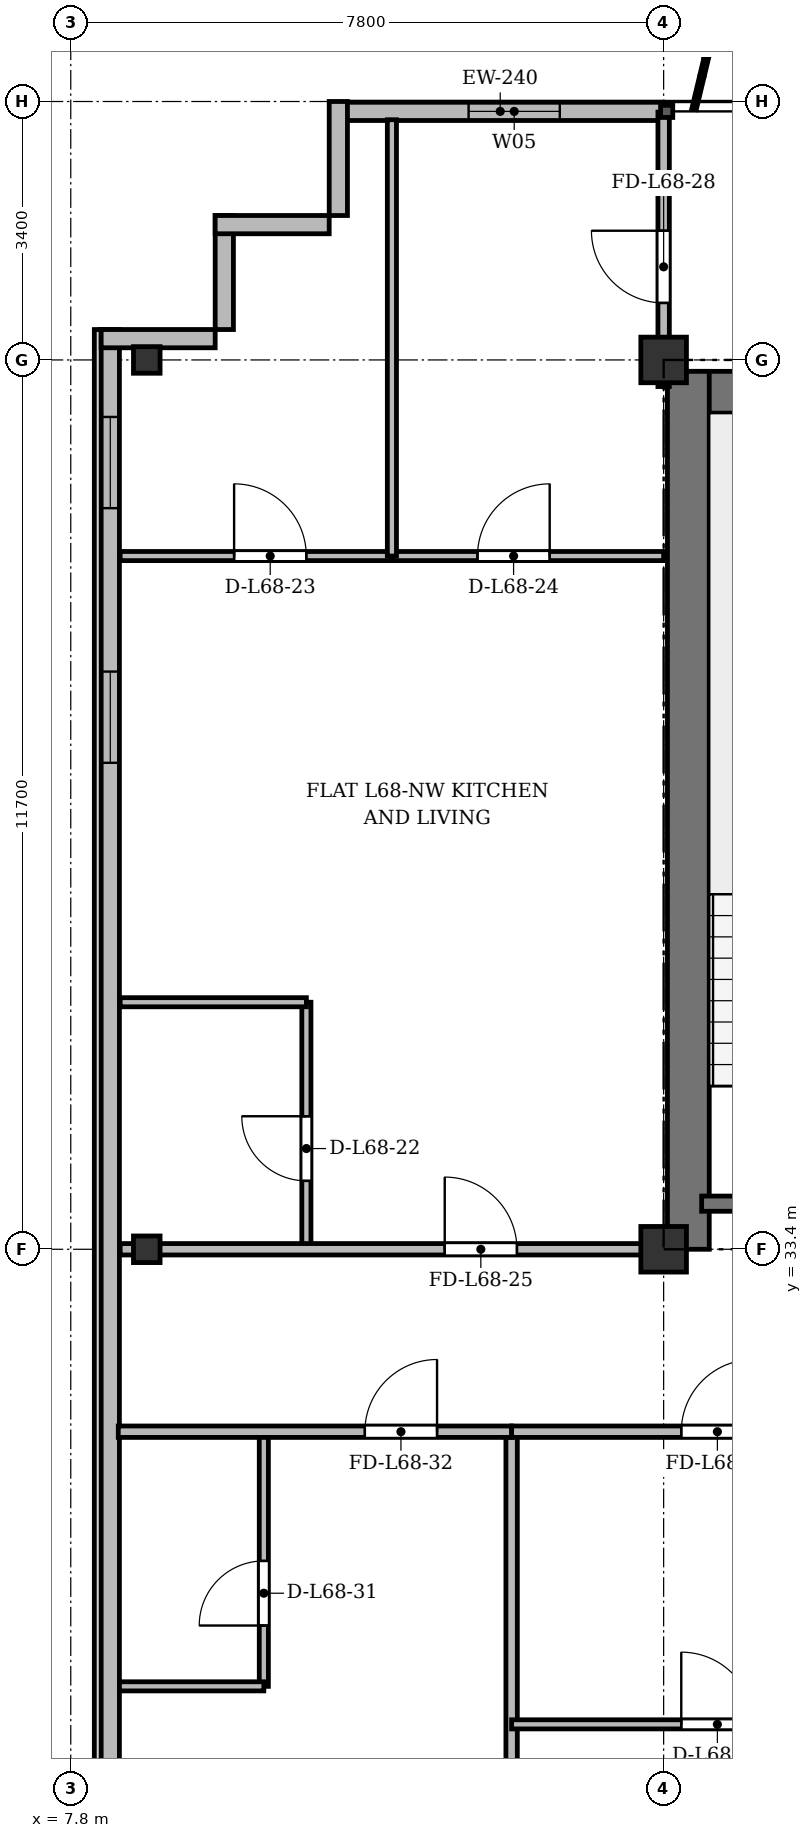
"""IFC4 building model, lengths in metres.
Left out: names, types, materials, properties, quantities, classifications, styles, units other than length and angle.
Written with IfcOpenShell. Run it as: python <this file> out.ifc"""

import sys

from ifc_helpers import new_model, si_unit, direction, frame, frame_2d, origin, origin_2d, place, context, subcontext, project, spatial, rectangle, i_section, extrude, source, transform, mapped, element, fill, save


model = new_model("IFC4")
c1 = context("Model", 3, precision=1e-05, world=origin(), true_north=direction((0.0, 1.0)))
c2 = subcontext(c1, "Body", "Model", "MODEL_VIEW")
j1 = project(units=[si_unit("LENGTHUNIT", "METRE"), si_unit("PLANEANGLEUNIT", "RADIAN")], contexts=[c1])
p1 = place(None, origin())
s1 = spatial("IfcSite", under=j1, at=p1, CompositionType="ELEMENT")
p2 = place(p1, origin())
s2 = spatial("IfcBuilding", under=s1, at=p2, CompositionType="ELEMENT")
p3 = place(p2, frame((0.0, 0.0, 263.1)))
s3 = spatial("IfcBuildingStorey", under=s2, at=p3, CompositionType="ELEMENT", Elevation=263.1)
m1 = source(origin(), c2, "Body", "SweptSolid", [
    extrude(i_section(OverallWidth=0.35, OverallDepth=0.35, WebThickness=0.018, FlangeThickness=0.028, at=origin_2d()), origin(), (0.0, 0.0, 1.0), 3.6),
])
for number, where, z_axis, x_axis in (
    (1, (8.8, 33.4, 0.0), (0.0, 0.0, 1.0), (1.0, 0.0, 0.0)),
    (2, (8.8, 45.1, 0.0), (0.0, 0.0, 1.0), (1.0, 0.0, 0.0)),
):
    element("IfcColumn", number, at=place(p3, frame(where, z_axis=z_axis, x_axis=x_axis)), inside=s3, PredefinedType="COLUMN", context=c2, shape_type="MappedRepresentation", body=[
        mapped(m1, transform((0.0, 0.0, 0.0), x_axis=(1.0, 0.0, 0.0), y_axis=(0.0, 1.0, 0.0), z_axis=(0.0, 0.0, 1.0), scale=1.0)),
    ])
m2 = source(origin(), c2, "Body", "SweptSolid", [
    extrude(rectangle(XDim=0.6, YDim=0.6, at=origin_2d()), origin(), (0.0, 0.0, 1.0), 3.6),
])
for number, where, z_axis, x_axis in (
    (3, (15.6, 33.4, 0.0), (0.0, 0.0, 1.0), (1.0, 0.0, 0.0)),
    (4, (15.6, 45.1, 0.0), (0.0, 0.0, 1.0), (1.0, 0.0, 0.0)),
):
    element("IfcColumn", number, at=place(p3, frame(where, z_axis=z_axis, x_axis=x_axis)), inside=s3, PredefinedType="COLUMN", context=c2, shape_type="MappedRepresentation", body=[
        mapped(m2, transform((0.0, 0.0, 0.0), x_axis=(1.0, 0.0, 0.0), y_axis=(0.0, 1.0, 0.0), z_axis=(0.0, 0.0, 1.0), scale=1.0)),
    ])
p4 = place(p3, frame((11.3, 48.37, 0.0), z_axis=(0.0, 0.0, 1.0), x_axis=(1.0, 0.0, 0.0)))
e5 = element("IfcWall", 5, at=p4, inside=s3, PredefinedType="SOLIDWALL", context=c2, shape_type="SweptSolid", body=[
    extrude(rectangle(XDim=4.3, YDim=0.24, at=frame_2d((2.15, 0.0))), origin(), (0.0, 0.0, 1.0), 3.37),
])
p5 = place(p4, frame((1.734, 0.0, 0.9)))
e6 = element("IfcOpeningElement", 6, at=p5, cuts=e5, PredefinedType="OPENING", context=c2, shape_type="SweptSolid", body=[
    extrude(rectangle(XDim=1.2, YDim=1.65, at=frame_2d((0.6, 0.825))), frame((0.0, 0.13, 0.0), z_axis=(0.0, -1.0, 0.0), x_axis=(1.0, 0.0, 0.0)), (0.0, 0.0, 1.0), 0.26),
])
p6 = place(p3, frame((8.32, 6.5, 0.0), z_axis=(0.0, 0.0, 1.0), x_axis=(0.0, 1.0, 0.0)))
e7 = element("IfcWall", 7, at=p6, inside=s3, PredefinedType="SOLIDWALL", context=c2, shape_type="SweptSolid", body=[
    extrude(rectangle(XDim=39.0, YDim=0.24, at=frame_2d((19.5, 0.0))), origin(), (0.0, 0.0, 1.0), 3.37),
])
p7 = place(p6, frame((1.45, 0.0, 0.92)))
e8 = element("IfcOpeningElement", 8, at=p7, cuts=e7, PredefinedType="OPENING", context=c2, shape_type="SweptSolid", body=[
    extrude(rectangle(XDim=1.2, YDim=1.65, at=frame_2d((0.6, 0.825))), frame((0.0, 0.13, 0.0), z_axis=(0.0, -1.0, 0.0), x_axis=(1.0, 0.0, 0.0)), (0.0, 0.0, 1.0), 0.26),
])
p8 = place(p6, frame((3.6, 0.0, 0.92)))
e9 = element("IfcOpeningElement", 9, at=p8, cuts=e7, PredefinedType="OPENING", context=c2, shape_type="SweptSolid", body=[
    extrude(rectangle(XDim=2.6, YDim=1.9, at=frame_2d((1.3, 0.95))), frame((0.0, 0.13, 0.0), z_axis=(0.0, -1.0, 0.0), x_axis=(1.0, 0.0, 0.0)), (0.0, 0.0, 1.0), 0.26),
])
p9 = place(p6, frame((7.8, 0.0, 0.92)))
e10 = element("IfcOpeningElement", 10, at=p9, cuts=e7, PredefinedType="OPENING", context=c2, shape_type="SweptSolid", body=[
    extrude(rectangle(XDim=2.6, YDim=1.9, at=frame_2d((1.3, 0.95))), frame((0.0, 0.13, 0.0), z_axis=(0.0, -1.0, 0.0), x_axis=(1.0, 0.0, 0.0)), (0.0, 0.0, 1.0), 0.26),
])
p10 = place(p6, frame((15.0, 0.0, 0.92)))
e11 = element("IfcOpeningElement", 11, at=p10, cuts=e7, PredefinedType="OPENING", context=c2, shape_type="SweptSolid", body=[
    extrude(rectangle(XDim=2.6, YDim=1.9, at=frame_2d((1.3, 0.95))), frame((0.0, 0.13, 0.0), z_axis=(0.0, -1.0, 0.0), x_axis=(1.0, 0.0, 0.0)), (0.0, 0.0, 1.0), 0.26),
])
p11 = place(p6, frame((33.3, 0.0, 0.92)))
e12 = element("IfcOpeningElement", 12, at=p11, cuts=e7, PredefinedType="OPENING", context=c2, shape_type="SweptSolid", body=[
    extrude(rectangle(XDim=1.2, YDim=1.65, at=frame_2d((0.6, 0.825))), frame((0.0, 0.13, 0.0), z_axis=(0.0, -1.0, 0.0), x_axis=(1.0, 0.0, 0.0)), (0.0, 0.0, 1.0), 0.26),
])
p12 = place(p6, frame((36.65, 0.0, 0.92)))
e13 = element("IfcOpeningElement", 13, at=p12, cuts=e7, PredefinedType="OPENING", context=c2, shape_type="SweptSolid", body=[
    extrude(rectangle(XDim=1.2, YDim=1.65, at=frame_2d((0.6, 0.825))), frame((0.0, 0.13, 0.0), z_axis=(0.0, -1.0, 0.0), x_axis=(1.0, 0.0, 0.0)), (0.0, 0.0, 1.0), 0.26),
])
for number, where, z_axis, x_axis in (
    (14, (8.2, 45.38, 0.0), (0.0, 0.0, 1.0), (1.0, 0.0, 0.0)),
    (15, (9.82, 45.5, 0.0), (0.0, 0.0, 1.0), (0.0, 1.0, 0.0)),
    (16, (9.7, 46.88, 0.0), (0.0, 0.0, 1.0), (1.0, 0.0, 0.0)),
    (17, (11.32, 47.0, 0.0), (0.0, 0.0, 1.0), (0.0, 1.0, 0.0)),
):
    element("IfcWall", number, at=place(p3, frame(where, z_axis=z_axis, x_axis=x_axis)), inside=s3, PredefinedType="SOLIDWALL", context=c2, shape_type="SweptSolid", body=[
        extrude(rectangle(XDim=1.5, YDim=0.24, at=frame_2d((0.75, 0.0))), origin(), (0.0, 0.0, 1.0), 3.37),
    ])
p13 = place(p3, frame((15.65, 44.675, 0.0), z_axis=(0.0, 0.0, 1.0), x_axis=(1.0, 0.0, 0.0)))
e18 = element("IfcWall", 18, at=p13, inside=s3, PredefinedType="SHEAR", context=c2, shape_type="SweptSolid", body=[
    extrude(rectangle(XDim=43.1, YDim=0.55, at=frame_2d((21.55, 0.0))), origin(), (0.0, 0.0, 1.0), 3.37),
])
p14 = place(p3, frame((15.925, 33.4, 0.0), z_axis=(0.0, 0.0, 1.0), x_axis=(0.0, 1.0, 0.0)))
e19 = element("IfcWall", 19, at=p14, inside=s3, PredefinedType="SHEAR", context=c2, shape_type="SweptSolid", body=[
    extrude(rectangle(XDim=11.55, YDim=0.55, at=frame_2d((5.775, 0.0))), origin(), (0.0, 0.0, 1.0), 3.37),
])
p15 = place(p3, frame((16.1, 34.0, 0.0), z_axis=(0.0, 0.0, 1.0), x_axis=(1.0, 0.0, 0.0)))
e20 = element("IfcWall", 20, at=p15, inside=s3, PredefinedType="SHEAR", context=c2, shape_type="SweptSolid", body=[
    extrude(rectangle(XDim=3.4, YDim=0.2, at=frame_2d((1.7, 0.0))), origin(), (0.0, 0.0, 1.0), 3.37),
])
p16 = place(p3, frame((10.9, 33.4, 0.0), z_axis=(0.0, 0.0, 1.0), x_axis=(0.0, 1.0, 0.0)))
e21 = element("IfcWall", 21, at=p16, inside=s3, PredefinedType="PARTITIONING", context=c2, shape_type="SweptSolid", body=[
    extrude(rectangle(XDim=3.25, YDim=0.12, at=frame_2d((1.625, 0.0))), origin(), (0.0, 0.0, 1.0), 2.92),
])
p17 = place(p16, frame((0.9, 0.0, 0.0)))
e22 = element("IfcOpeningElement", 22, at=p17, cuts=e21, PredefinedType="OPENING", context=c2, shape_type="SweptSolid", body=[
    extrude(rectangle(XDim=0.85, YDim=2.1, at=frame_2d((0.425, 1.05))), frame((0.0, 0.07, 0.0), z_axis=(0.0, -1.0, 0.0), x_axis=(1.0, 0.0, 0.0)), (0.0, 0.0, 1.0), 0.14),
])
p18 = place(p3, frame((8.45, 36.65, 0.0), z_axis=(0.0, 0.0, 1.0), x_axis=(1.0, 0.0, 0.0)))
e23 = element("IfcWall", 23, at=p18, inside=s3, PredefinedType="PARTITIONING", context=c2, shape_type="SweptSolid", body=[
    extrude(rectangle(XDim=2.45, YDim=0.12, at=frame_2d((1.225, 0.0))), origin(), (0.0, 0.0, 1.0), 2.87),
])
p19 = place(p3, frame((8.45, 42.52, 0.0), z_axis=(0.0, 0.0, 1.0), x_axis=(1.0, 0.0, 0.0)))
e24 = element("IfcWall", 24, at=p19, inside=s3, PredefinedType="PARTITIONING", context=c2, shape_type="SweptSolid", body=[
    extrude(rectangle(XDim=3.575, YDim=0.12, at=frame_2d((1.788, 0.0))), origin(), (0.0, 0.0, 1.0), 2.87),
])
p20 = place(p19, frame((1.499, 0.0, 0.0)))
e25 = element("IfcOpeningElement", 25, at=p20, cuts=e24, PredefinedType="OPENING", context=c2, shape_type="SweptSolid", body=[
    extrude(rectangle(XDim=0.95, YDim=2.15, at=frame_2d((0.475, 1.075))), frame((0.0, 0.07, 0.0), z_axis=(0.0, -1.0, 0.0), x_axis=(1.0, 0.0, 0.0)), (0.0, 0.0, 1.0), 0.14),
])
p21 = place(p3, frame((12.025, 42.52, 0.0), z_axis=(0.0, 0.0, 1.0), x_axis=(1.0, 0.0, 0.0)))
e26 = element("IfcWall", 26, at=p21, inside=s3, PredefinedType="PARTITIONING", context=c2, shape_type="SweptSolid", body=[
    extrude(rectangle(XDim=3.575, YDim=0.12, at=frame_2d((1.788, 0.0))), origin(), (0.0, 0.0, 1.0), 2.87),
])
p22 = place(p21, frame((1.126, 0.0, 0.0)))
e27 = element("IfcOpeningElement", 27, at=p22, cuts=e26, PredefinedType="OPENING", context=c2, shape_type="SweptSolid", body=[
    extrude(rectangle(XDim=0.95, YDim=2.15, at=frame_2d((0.475, 1.075))), frame((0.0, 0.07, 0.0), z_axis=(0.0, -1.0, 0.0), x_axis=(1.0, 0.0, 0.0)), (0.0, 0.0, 1.0), 0.14),
])
p23 = place(p3, frame((12.025, 42.52, 0.0), z_axis=(0.0, 0.0, 1.0), x_axis=(0.0, 1.0, 0.0)))
e28 = element("IfcWall", 28, at=p23, inside=s3, PredefinedType="PARTITIONING", context=c2, shape_type="SweptSolid", body=[
    extrude(rectangle(XDim=5.74, YDim=0.12, at=frame_2d((2.87, 0.0))), origin(), (0.0, 0.0, 1.0), 2.92),
])
p24 = place(p3, frame((8.45, 33.4, 0.0), z_axis=(0.0, 0.0, 1.0), x_axis=(1.0, 0.0, 0.0)))
e29 = element("IfcWall", 29, at=p24, inside=s3, PredefinedType="PARTITIONING", context=c2, shape_type="SweptSolid", body=[
    extrude(rectangle(XDim=7.15, YDim=0.15, at=frame_2d((3.575, 0.0))), origin(), (0.0, 0.0, 1.0), 2.92),
])
p25 = place(p24, frame((4.27, 0.0, 0.0)))
e30 = element("IfcOpeningElement", 30, at=p25, cuts=e29, PredefinedType="OPENING", context=c2, shape_type="SweptSolid", body=[
    extrude(rectangle(XDim=0.95, YDim=2.15, at=frame_2d((0.475, 1.075))), frame((0.0, 0.085, 0.0), z_axis=(0.0, -1.0, 0.0), x_axis=(1.0, 0.0, 0.0)), (0.0, 0.0, 1.0), 0.17),
])
p26 = place(p3, frame((15.6, 44.75, 0.0), z_axis=(0.0, 0.0, 1.0), x_axis=(0.0, 1.0, 0.0)))
e31 = element("IfcWall", 31, at=p26, inside=s3, PredefinedType="PARTITIONING", context=c2, shape_type="SweptSolid", body=[
    extrude(rectangle(XDim=3.61, YDim=0.15, at=frame_2d((1.805, 0.0))), origin(), (0.0, 0.0, 1.0), 2.87),
])
p27 = place(p26, frame((1.1, 0.0, 0.0)))
e32 = element("IfcOpeningElement", 32, at=p27, cuts=e31, PredefinedType="OPENING", context=c2, shape_type="SweptSolid", body=[
    extrude(rectangle(XDim=0.95, YDim=2.15, at=frame_2d((0.475, 1.075))), frame((0.0, 0.085, 0.0), z_axis=(0.0, -1.0, 0.0), x_axis=(1.0, 0.0, 0.0)), (0.0, 0.0, 1.0), 0.17),
])
p28 = place(p3, frame((13.6, 3.725, 0.0), z_axis=(0.0, 0.0, 1.0), x_axis=(0.0, 1.0, 0.0)))
e33 = element("IfcWall", 33, at=p28, inside=s3, PredefinedType="PARTITIONING", context=c2, shape_type="SweptSolid", body=[
    extrude(rectangle(XDim=27.275, YDim=0.15, at=frame_2d((13.637, 0.0))), origin(), (0.0, 0.0, 1.0), 2.92),
])
p29 = place(p3, frame((10.34, 27.65, 0.0), z_axis=(0.0, 0.0, 1.0), x_axis=(0.0, 1.0, 0.0)))
e34 = element("IfcWall", 34, at=p29, inside=s3, PredefinedType="PARTITIONING", context=c2, shape_type="SweptSolid", body=[
    extrude(rectangle(XDim=3.35, YDim=0.12, at=frame_2d((1.675, 0.0))), origin(), (0.0, 0.0, 1.0), 3.37),
])
p30 = place(p29, frame((0.8, 0.0, 0.0)))
e35 = element("IfcOpeningElement", 35, at=p30, cuts=e34, PredefinedType="OPENING", context=c2, shape_type="SweptSolid", body=[
    extrude(rectangle(XDim=0.85, YDim=2.1, at=frame_2d((0.425, 1.05))), frame((0.0, 0.07, 0.0), z_axis=(0.0, -1.0, 0.0), x_axis=(1.0, 0.0, 0.0)), (0.0, 0.0, 1.0), 0.14),
])
p31 = place(p3, frame((8.44, 27.65, 0.0), z_axis=(0.0, 0.0, 1.0), x_axis=(1.0, 0.0, 0.0)))
e36 = element("IfcWall", 36, at=p31, inside=s3, PredefinedType="PARTITIONING", context=c2, shape_type="SweptSolid", body=[
    extrude(rectangle(XDim=1.9, YDim=0.12, at=frame_2d((0.95, 0.0))), origin(), (0.0, 0.0, 1.0), 2.87),
])
p32 = place(p3, frame((8.425, 31.0, 0.0), z_axis=(0.0, 0.0, 1.0), x_axis=(1.0, 0.0, 0.0)))
e37 = element("IfcWall", 37, at=p32, inside=s3, PredefinedType="PARTITIONING", context=c2, shape_type="SweptSolid", body=[
    extrude(rectangle(XDim=5.175, YDim=0.15, at=frame_2d((2.587, 0.0))), origin(), (0.0, 0.0, 1.0), 2.87),
])
p33 = place(p32, frame((3.244, 0.0, 0.0)))
e38 = element("IfcOpeningElement", 38, at=p33, cuts=e37, PredefinedType="OPENING", context=c2, shape_type="SweptSolid", body=[
    extrude(rectangle(XDim=0.95, YDim=2.15, at=frame_2d((0.475, 1.075))), frame((0.0, 0.085, 0.0), z_axis=(0.0, -1.0, 0.0), x_axis=(1.0, 0.0, 0.0)), (0.0, 0.0, 1.0), 0.17),
])
p34 = place(p3, frame((13.6, 31.0, 0.0), z_axis=(0.0, 0.0, 1.0), x_axis=(1.0, 0.0, 0.0)))
e39 = element("IfcWall", 39, at=p34, inside=s3, PredefinedType="PARTITIONING", context=c2, shape_type="SweptSolid", body=[
    extrude(rectangle(XDim=5.6, YDim=0.15, at=frame_2d((2.8, 0.0))), origin(), (0.0, 0.0, 1.0), 2.87),
])
p35 = place(p34, frame((2.232, 0.0, 0.0)))
e40 = element("IfcOpeningElement", 40, at=p35, cuts=e39, PredefinedType="OPENING", context=c2, shape_type="SweptSolid", body=[
    extrude(rectangle(XDim=0.95, YDim=2.15, at=frame_2d((0.475, 1.075))), frame((0.0, 0.085, 0.0), z_axis=(0.0, -1.0, 0.0), x_axis=(1.0, 0.0, 0.0)), (0.0, 0.0, 1.0), 0.17),
])
p36 = place(p3, frame((13.6, 27.15, 0.0), z_axis=(0.0, 0.0, 1.0), x_axis=(1.0, 0.0, 0.0)))
e41 = element("IfcWall", 41, at=p36, inside=s3, PredefinedType="PARTITIONING", context=c2, shape_type="SweptSolid", body=[
    extrude(rectangle(XDim=5.6, YDim=0.12, at=frame_2d((2.8, 0.0))), origin(), (0.0, 0.0, 1.0), 2.87),
])
p37 = place(p36, frame((2.232, 0.0, 0.0)))
e42 = element("IfcOpeningElement", 42, at=p37, cuts=e41, PredefinedType="OPENING", context=c2, shape_type="SweptSolid", body=[
    extrude(rectangle(XDim=0.95, YDim=2.15, at=frame_2d((0.475, 1.075))), frame((0.0, 0.07, 0.0), z_axis=(0.0, -1.0, 0.0), x_axis=(1.0, 0.0, 0.0)), (0.0, 0.0, 1.0), 0.14),
])
m3 = source(origin(), c2, "Body", "SweptSolid", [
    extrude(rectangle(XDim=1.2, YDim=1.65, at=frame_2d((0.6, 0.825))), frame((0.0, 0.03, 0.0), z_axis=(0.0, -1.0, 0.0), x_axis=(1.0, 0.0, 0.0)), (0.0, 0.0, 1.0), 0.06),
])
p38 = place(p5, origin())
e43 = element("IfcWindow", 43, at=p38, inside=s3, PartitioningType="SINGLE_PANEL", PredefinedType="WINDOW", context=c2, shape_type="MappedRepresentation", body=[
    mapped(m3, transform((0.0, 0.0, 0.0), x_axis=(1.0, 0.0, 0.0), y_axis=(0.0, 1.0, 0.0), z_axis=(0.0, 0.0, 1.0), scale=1.0)),
])
fill(e6, e43)
p39 = place(p11, origin())
e44 = element("IfcWindow", 44, at=p39, inside=s3, PartitioningType="SINGLE_PANEL", PredefinedType="WINDOW", context=c2, shape_type="MappedRepresentation", body=[
    mapped(m3, transform((0.0, 0.0, 0.0), x_axis=(1.0, 0.0, 0.0), y_axis=(0.0, 1.0, 0.0), z_axis=(0.0, 0.0, 1.0), scale=1.0)),
])
fill(e12, e44)
p40 = place(p12, origin())
e45 = element("IfcWindow", 45, at=p40, inside=s3, PartitioningType="SINGLE_PANEL", PredefinedType="WINDOW", context=c2, shape_type="MappedRepresentation", body=[
    mapped(m3, transform((0.0, 0.0, 0.0), x_axis=(1.0, 0.0, 0.0), y_axis=(0.0, 1.0, 0.0), z_axis=(0.0, 0.0, 1.0), scale=1.0)),
])
fill(e13, e45)
m4 = source(origin(), c2, "Body", "SweptSolid", [
    extrude(rectangle(XDim=0.85, YDim=2.1, at=frame_2d((0.425, 1.05))), frame((0.0, 0.025, 0.0), z_axis=(0.0, -1.0, 0.0), x_axis=(1.0, 0.0, 0.0)), (0.0, 0.0, 1.0), 0.05),
])
p41 = place(p17, origin())
e46 = element("IfcDoor", 46, at=p41, inside=s3, OperationType="SINGLE_SWING_RIGHT", PredefinedType="DOOR", context=c2, shape_type="MappedRepresentation", body=[
    mapped(m4, transform((0.0, 0.0, 0.0), x_axis=(1.0, 0.0, 0.0), y_axis=(0.0, 1.0, 0.0), z_axis=(0.0, 0.0, 1.0), scale=1.0)),
])
fill(e22, e46)
m5 = source(origin(), c2, "Body", "SweptSolid", [
    extrude(rectangle(XDim=0.95, YDim=2.15, at=frame_2d((0.475, 1.075))), frame((0.0, 0.025, 0.0), z_axis=(0.0, -1.0, 0.0), x_axis=(1.0, 0.0, 0.0)), (0.0, 0.0, 1.0), 0.05),
])
p42 = place(p20, origin())
e47 = element("IfcDoor", 47, at=p42, inside=s3, OperationType="SINGLE_SWING_LEFT", PredefinedType="DOOR", context=c2, shape_type="MappedRepresentation", body=[
    mapped(m5, transform((0.0, 0.0, 0.0), x_axis=(1.0, 0.0, 0.0), y_axis=(0.0, 1.0, 0.0), z_axis=(0.0, 0.0, 1.0), scale=1.0)),
])
fill(e25, e47)
p43 = place(p22, origin())
e48 = element("IfcDoor", 48, at=p43, inside=s3, OperationType="SINGLE_SWING_RIGHT", PredefinedType="DOOR", context=c2, shape_type="MappedRepresentation", body=[
    mapped(m5, transform((0.0, 0.0, 0.0), x_axis=(1.0, 0.0, 0.0), y_axis=(0.0, 1.0, 0.0), z_axis=(0.0, 0.0, 1.0), scale=1.0)),
])
fill(e27, e48)
p44 = place(p25, origin())
e49 = element("IfcDoor", 49, at=p44, inside=s3, OperationType="SINGLE_SWING_LEFT", PredefinedType="DOOR", context=c2, shape_type="MappedRepresentation", body=[
    mapped(m5, transform((0.0, 0.0, 0.0), x_axis=(1.0, 0.0, 0.0), y_axis=(0.0, 1.0, 0.0), z_axis=(0.0, 0.0, 1.0), scale=1.0)),
])
fill(e30, e49)
p45 = place(p27, origin())
e50 = element("IfcDoor", 50, at=p45, inside=s3, OperationType="SINGLE_SWING_RIGHT", PredefinedType="DOOR", context=c2, shape_type="MappedRepresentation", body=[
    mapped(m5, transform((0.0, 0.0, 0.0), x_axis=(1.0, 0.0, 0.0), y_axis=(0.0, 1.0, 0.0), z_axis=(0.0, 0.0, 1.0), scale=1.0)),
])
fill(e32, e50)
p46 = place(p30, origin())
e51 = element("IfcDoor", 51, at=p46, inside=s3, OperationType="SINGLE_SWING_LEFT", PredefinedType="DOOR", context=c2, shape_type="MappedRepresentation", body=[
    mapped(m4, transform((0.0, 0.0, 0.0), x_axis=(1.0, 0.0, 0.0), y_axis=(0.0, 1.0, 0.0), z_axis=(0.0, 0.0, 1.0), scale=1.0)),
])
fill(e35, e51)
p47 = place(p33, origin())
e52 = element("IfcDoor", 52, at=p47, inside=s3, OperationType="SINGLE_SWING_RIGHT", PredefinedType="DOOR", context=c2, shape_type="MappedRepresentation", body=[
    mapped(m5, transform((0.0, 0.0, 0.0), x_axis=(1.0, 0.0, 0.0), y_axis=(0.0, 1.0, 0.0), z_axis=(0.0, 0.0, 1.0), scale=1.0)),
])
fill(e38, e52)
p48 = place(p35, origin())
e53 = element("IfcDoor", 53, at=p48, inside=s3, OperationType="SINGLE_SWING_RIGHT", PredefinedType="DOOR", context=c2, shape_type="MappedRepresentation", body=[
    mapped(m5, transform((0.0, 0.0, 0.0), x_axis=(1.0, 0.0, 0.0), y_axis=(0.0, 1.0, 0.0), z_axis=(0.0, 0.0, 1.0), scale=1.0)),
])
fill(e40, e53)
p49 = place(p37, origin())
e54 = element("IfcDoor", 54, at=p49, inside=s3, OperationType="SINGLE_SWING_LEFT", PredefinedType="DOOR", context=c2, shape_type="MappedRepresentation", body=[
    mapped(m5, transform((0.0, 0.0, 0.0), x_axis=(1.0, 0.0, 0.0), y_axis=(0.0, 1.0, 0.0), z_axis=(0.0, 0.0, 1.0), scale=1.0)),
])
fill(e42, e54)
save(model, sys.argv[1])
